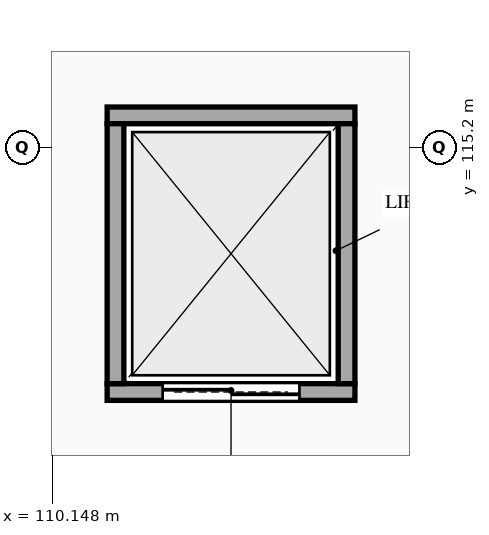
"""IFC4 building model, lengths in metres.
Left out: names, types, materials, properties, quantities, classifications, styles, units other than length and angle.
Written with IfcOpenShell. Run it as: python <this file> out.ifc"""

import sys

from ifc_helpers import new_model, si_unit, direction, frame, frame_2d, origin, place, context, subcontext, project, spatial, rectangle, extrude, element, fill, save


model = new_model("IFC4")
c1 = context("Model", 3, precision=1e-05, world=origin(), true_north=direction((0.0, 1.0)))
c2 = subcontext(c1, "Body", "Model", "MODEL_VIEW")
j1 = project(units=[si_unit("LENGTHUNIT", "METRE"), si_unit("PLANEANGLEUNIT", "RADIAN")], contexts=[c1])
p1 = place(None, origin())
s1 = spatial("IfcSite", under=j1, at=p1, CompositionType="ELEMENT")
p2 = place(p1, origin())
s2 = spatial("IfcBuilding", under=s1, at=p2, CompositionType="ELEMENT")
p3 = place(p2, frame((0.0, 0.0, 10.8)))
s3 = spatial("IfcBuildingStorey", under=s2, at=p3, CompositionType="ELEMENT", Elevation=10.8)
p4 = place(p3, frame((110.87, 111.98, 0.0), z_axis=(0.0, 0.0, 1.0), x_axis=(1.0, 0.0, 0.0)))
e1 = element("IfcWall", 1, at=p4, inside=s3, PredefinedType="STANDARD", context=c2, shape_type="SweptSolid", body=[
    extrude(rectangle(XDim=3.26, YDim=0.22, at=frame_2d((1.63, 0.0))), origin(), (0.0, 0.0, 1.0), 4.22),
])
p5 = place(p4, frame((0.73, 0.0, 0.0)))
e2 = element("IfcOpeningElement", 2, at=p5, cuts=e1, PredefinedType="OPENING", context=c2, shape_type="SweptSolid", body=[
    extrude(rectangle(XDim=1.8, YDim=2.35, at=frame_2d((0.9, 1.175))), frame((0.0, 0.12, 0.0), z_axis=(0.0, -1.0, 0.0), x_axis=(1.0, 0.0, 0.0)), (0.0, 0.0, 1.0), 0.24),
])
p6 = place(p3, frame((114.13, 115.62, 0.0), z_axis=(0.0, 0.0, 1.0), x_axis=(-1.0, 0.0, 0.0)))
e3 = element("IfcWall", 3, at=p6, inside=s3, PredefinedType="STANDARD", context=c2, shape_type="SweptSolid", body=[
    extrude(rectangle(XDim=3.26, YDim=0.22, at=frame_2d((1.63, 0.0))), origin(), (0.0, 0.0, 1.0), 4.22),
])
for number, where, z_axis, x_axis in (
    (4, (110.98, 115.51, 0.0), (0.0, 0.0, 1.0), (0.0, -1.0, 0.0)),
    (5, (114.02, 112.09, 0.0), (0.0, 0.0, 1.0), (0.0, 1.0, 0.0)),
):
    element("IfcWall", number, at=place(p3, frame(where, z_axis=z_axis, x_axis=x_axis)), inside=s3, PredefinedType="STANDARD", context=c2, shape_type="SweptSolid", body=[
        extrude(rectangle(XDim=3.42, YDim=0.22, at=frame_2d((1.71, 0.0))), origin(), (0.0, 0.0, 1.0), 4.22),
    ])
p7 = place(p5, origin())
e6 = element("IfcDoor", 6, at=p7, inside=s3, OperationType="DOUBLE_DOOR_SLIDING", PredefinedType="DOOR", context=c2, shape_type="SweptSolid", body=[
    extrude(rectangle(XDim=1.8, YDim=2.35, at=frame_2d((0.9, 1.175))), frame((0.0, 0.025, 0.0), z_axis=(0.0, -1.0, 0.0), x_axis=(1.0, 0.0, 0.0)), (0.0, 0.0, 1.0), 0.05),
])
fill(e2, e6)
save(model, sys.argv[1])
